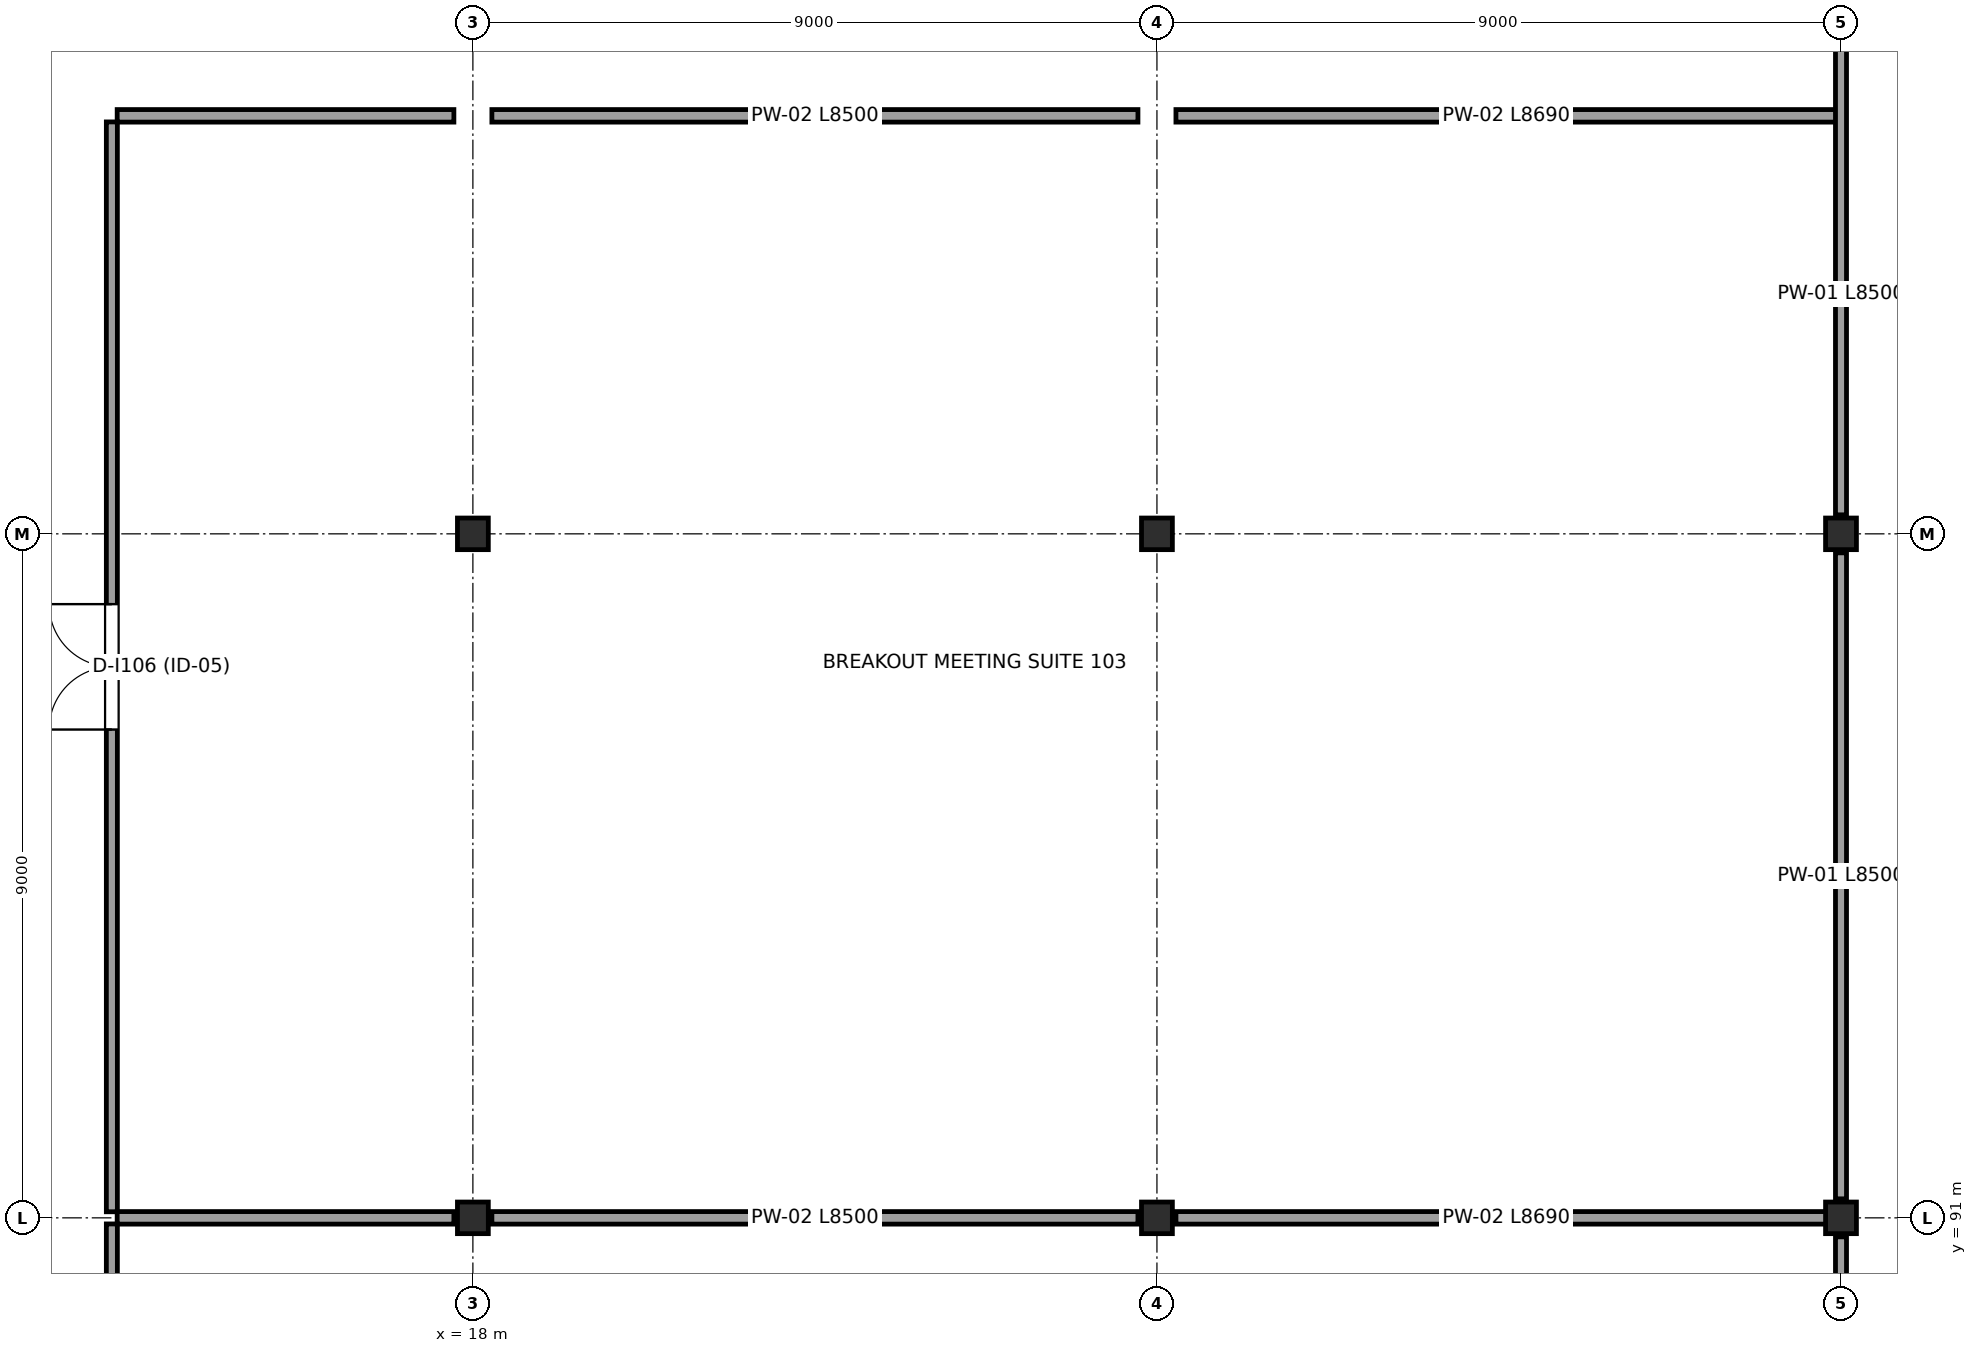
"""IFC4 building model, lengths in metres.
Left out: names, types, materials, properties, quantities, classifications, styles, units other than length and angle.
Written with IfcOpenShell. Run it as: python <this file> out.ifc"""

import sys

from ifc_helpers import new_model, si_unit, direction, frame, frame_2d, origin, origin_2d, place, context, subcontext, project, spatial, rectangle, i_section, extrude, element, fill, save


model = new_model("IFC4")
c1 = context("Model", 3, precision=1e-05, world=origin(), true_north=direction((0.0, 1.0)))
c2 = subcontext(c1, "Body", "Model", "MODEL_VIEW")
j1 = project(units=[si_unit("LENGTHUNIT", "METRE"), si_unit("PLANEANGLEUNIT", "RADIAN")], contexts=[c1])
p1 = place(None, origin())
s1 = spatial("IfcSite", under=j1, at=p1, CompositionType="ELEMENT")
p2 = place(p1, origin())
s2 = spatial("IfcBuilding", under=s1, at=p2, CompositionType="ELEMENT")
p3 = place(p2, frame((0.0, 0.0, 6.0)))
s3 = spatial("IfcBuildingStorey", under=s2, at=p3, CompositionType="ELEMENT", Elevation=6.0)
for number, where, z_axis, x_axis in (
    (1, (18.0, 91.0, 0.0), (0.0, 0.0, 1.0), (1.0, 0.0, 0.0)),
    (2, (18.0, 100.0, 0.0), (0.0, 0.0, 1.0), (1.0, 0.0, 0.0)),
    (3, (27.0, 91.0, 0.0), (0.0, 0.0, 1.0), (1.0, 0.0, 0.0)),
    (4, (27.0, 100.0, 0.0), (0.0, 0.0, 1.0), (1.0, 0.0, 0.0)),
    (5, (36.0, 91.0, 0.0), (0.0, 0.0, 1.0), (1.0, 0.0, 0.0)),
    (6, (36.0, 100.0, 0.0), (0.0, 0.0, 1.0), (1.0, 0.0, 0.0)),
):
    element("IfcColumn", number, at=place(p3, frame(where, z_axis=z_axis, x_axis=x_axis)), inside=s3, PredefinedType="COLUMN", context=c2, shape_type="SweptSolid", body=[
        extrude(i_section(OverallWidth=0.406, OverallDepth=0.416, WebThickness=0.03, FlangeThickness=0.048, at=origin_2d()), origin(), (0.0, 0.0, 1.0), 6.0),
    ])
p4 = place(p3, frame((13.25, 73.08, 0.0), z_axis=(0.0, 0.0, 1.0), x_axis=(0.0, 1.0, 0.0)))
e7 = element("IfcWall", 7, at=p4, inside=s3, PredefinedType="PARTITIONING", context=c2, shape_type="SweptSolid", body=[
    extrude(rectangle(XDim=17.84, YDim=0.145, at=frame_2d((8.92, 0.0))), origin(), (0.0, 0.0, 1.0), 4.55),
])
p5 = place(p4, frame((8.095, 0.0, 0.0)))
e8 = element("IfcOpeningElement", 8, at=p5, cuts=e7, PredefinedType="OPENING", context=c2, shape_type="SweptSolid", body=[
    extrude(rectangle(XDim=1.65, YDim=2.25, at=frame_2d((0.825, 1.125))), frame((0.0, 0.083, 0.0), z_axis=(0.0, -1.0, 0.0), x_axis=(1.0, 0.0, 0.0)), (0.0, 0.0, 1.0), 0.165),
])
p6 = place(p3, frame((13.25, 91.08, 0.0), z_axis=(0.0, 0.0, 1.0), x_axis=(0.0, 1.0, 0.0)))
e9 = element("IfcWall", 9, at=p6, inside=s3, PredefinedType="PARTITIONING", context=c2, shape_type="SweptSolid", body=[
    extrude(rectangle(XDim=14.34, YDim=0.145, at=frame_2d((7.17, 0.0))), origin(), (0.0, 0.0, 1.0), 4.55),
])
p7 = place(p6, frame((6.345, 0.0, 0.0)))
e10 = element("IfcOpeningElement", 10, at=p7, cuts=e9, PredefinedType="OPENING", context=c2, shape_type="SweptSolid", body=[
    extrude(rectangle(XDim=1.65, YDim=2.25, at=frame_2d((0.825, 1.125))), frame((0.0, 0.083, 0.0), z_axis=(0.0, -1.0, 0.0), x_axis=(1.0, 0.0, 0.0)), (0.0, 0.0, 1.0), 0.165),
])
p8 = place(p3, frame((13.32, 91.0, 0.0), z_axis=(0.0, 0.0, 1.0), x_axis=(1.0, 0.0, 0.0)))
e11 = element("IfcWall", 11, at=p8, inside=s3, PredefinedType="PARTITIONING", context=c2, shape_type="SweptSolid", body=[
    extrude(rectangle(XDim=4.43, YDim=0.165, at=frame_2d((2.215, 0.0))), origin(), (0.0, 0.0, 1.0), 4.55),
])
p9 = place(p3, frame((18.25, 91.0, 0.0), z_axis=(0.0, 0.0, 1.0), x_axis=(1.0, 0.0, 0.0)))
e12 = element("IfcWall", 12, at=p9, inside=s3, PredefinedType="PARTITIONING", context=c2, shape_type="SweptSolid", body=[
    extrude(rectangle(XDim=8.5, YDim=0.165, at=frame_2d((4.25, 0.0))), origin(), (0.0, 0.0, 1.0), 4.55),
])
p10 = place(p3, frame((27.25, 91.0, 0.0), z_axis=(0.0, 0.0, 1.0), x_axis=(1.0, 0.0, 0.0)))
e13 = element("IfcWall", 13, at=p10, inside=s3, PredefinedType="PARTITIONING", context=c2, shape_type="SweptSolid", body=[
    extrude(rectangle(XDim=8.69, YDim=0.165, at=frame_2d((4.345, 0.0))), origin(), (0.0, 0.0, 1.0), 4.55),
])
p11 = place(p3, frame((13.32, 105.5, 0.0), z_axis=(0.0, 0.0, 1.0), x_axis=(1.0, 0.0, 0.0)))
e14 = element("IfcWall", 14, at=p11, inside=s3, PredefinedType="PARTITIONING", context=c2, shape_type="SweptSolid", body=[
    extrude(rectangle(XDim=4.43, YDim=0.165, at=frame_2d((2.215, 0.0))), origin(), (0.0, 0.0, 1.0), 4.55),
])
p12 = place(p3, frame((18.25, 105.5, 0.0), z_axis=(0.0, 0.0, 1.0), x_axis=(1.0, 0.0, 0.0)))
e15 = element("IfcWall", 15, at=p12, inside=s3, PredefinedType="PARTITIONING", context=c2, shape_type="SweptSolid", body=[
    extrude(rectangle(XDim=8.5, YDim=0.165, at=frame_2d((4.25, 0.0))), origin(), (0.0, 0.0, 1.0), 4.55),
])
p13 = place(p3, frame((27.25, 105.5, 0.0), z_axis=(0.0, 0.0, 1.0), x_axis=(1.0, 0.0, 0.0)))
e16 = element("IfcWall", 16, at=p13, inside=s3, PredefinedType="PARTITIONING", context=c2, shape_type="SweptSolid", body=[
    extrude(rectangle(XDim=8.69, YDim=0.165, at=frame_2d((4.345, 0.0))), origin(), (0.0, 0.0, 1.0), 4.55),
])
for number, where, z_axis, x_axis in (
    (17, (36.0, 82.25, 0.0), (0.0, 0.0, 1.0), (0.0, 1.0, 0.0)),
    (18, (36.0, 91.25, 0.0), (0.0, 0.0, 1.0), (0.0, 1.0, 0.0)),
):
    element("IfcWall", number, at=place(p3, frame(where, z_axis=z_axis, x_axis=x_axis)), inside=s3, PredefinedType="PARTITIONING", context=c2, shape_type="SweptSolid", body=[
        extrude(rectangle(XDim=8.5, YDim=0.145, at=frame_2d((4.25, 0.0))), origin(), (0.0, 0.0, 1.0), 4.55),
    ])
p14 = place(p3, frame((36.0, 100.25, 0.0), z_axis=(0.0, 0.0, 1.0), x_axis=(0.0, 1.0, 0.0)))
e19 = element("IfcWall", 19, at=p14, inside=s3, PredefinedType="PARTITIONING", context=c2, shape_type="SweptSolid", body=[
    extrude(rectangle(XDim=8.5, YDim=0.145, at=frame_2d((4.25, 0.0))), origin(), (0.0, 0.0, 1.0), 4.55),
])
p15 = place(p14, frame((6.15, 0.0, 0.0)))
e20 = element("IfcOpeningElement", 20, at=p15, cuts=e19, PredefinedType="OPENING", context=c2, shape_type="SweptSolid", body=[
    extrude(rectangle(XDim=1.08, YDim=2.26, at=frame_2d((0.54, 1.13))), frame((0.0, 0.083, 0.0), z_axis=(0.0, -1.0, 0.0), x_axis=(1.0, 0.0, 0.0)), (0.0, 0.0, 1.0), 0.165),
])
p16 = place(p7, origin())
e21 = element("IfcDoor", 21, at=p16, inside=s3, OperationType="DOUBLE_DOOR_SINGLE_SWING", PredefinedType="DOOR", context=c2, shape_type="SweptSolid", body=[
    extrude(rectangle(XDim=1.65, YDim=2.25, at=frame_2d((0.825, 1.125))), frame((0.0, 0.025, 0.0), z_axis=(0.0, -1.0, 0.0), x_axis=(1.0, 0.0, 0.0)), (0.0, 0.0, 1.0), 0.05),
])
fill(e10, e21)
save(model, sys.argv[1])
